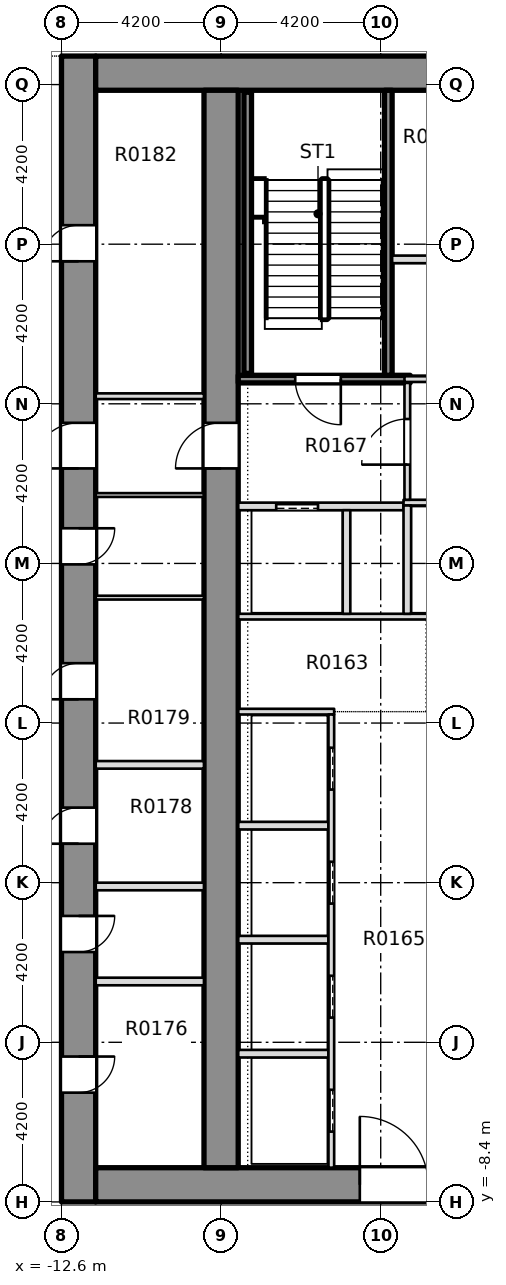
"""IFC4 building model, lengths in metres.
Left out: names, types, materials, properties, quantities, classifications, styles, units other than length and angle.
Written with IfcOpenShell. Run it as: python <this file> out.ifc"""

import sys

from ifc_helpers import new_model, si_unit, direction, frame, frame_2d, origin, place, context, subcontext, project, spatial, rectangle, extrude, element, fill, save


model = new_model("IFC4")
c1 = context("Model", 3, precision=1e-05, world=origin(), true_north=direction((0.0, 1.0)))
c2 = subcontext(c1, "Body", "Model", "MODEL_VIEW")
j1 = project(units=[si_unit("LENGTHUNIT", "METRE"), si_unit("PLANEANGLEUNIT", "RADIAN")], contexts=[c1])
p1 = place(None, origin())
s1 = spatial("IfcSite", under=j1, at=p1, CompositionType="ELEMENT")
p2 = place(p1, origin())
s2 = spatial("IfcBuilding", under=s1, at=p2, CompositionType="ELEMENT")
p3 = place(p2, frame((0.0, 0.0, 7.5)))
s3 = spatial("IfcBuildingStorey", under=s2, at=p3, CompositionType="ELEMENT", Elevation=7.5)
p4 = place(p3, frame((-12.15, -8.4, -0.4), z_axis=(0.0, 0.0, 1.0), x_axis=(0.0, 1.0, 0.0)))
e1 = element("IfcWall", 1, at=p4, inside=s3, PredefinedType="SHEAR", context=c2, shape_type="SweptSolid", body=[
    extrude(rectangle(XDim=30.15, YDim=0.9, at=frame_2d((15.075, 0.0))), origin(), (0.0, 0.0, 1.0), 5.0),
])
p5 = place(p4, frame((2.875, 0.0, 0.4)))
e2 = element("IfcOpeningElement", 2, at=p5, cuts=e1, PredefinedType="OPENING", context=c2, shape_type="SweptSolid", body=[
    extrude(rectangle(XDim=0.95, YDim=2.1, at=frame_2d((0.475, 1.05))), frame((0.0, 0.46, 0.0), z_axis=(0.0, -1.0, 0.0), x_axis=(1.0, 0.0, 0.0)), (0.0, 0.0, 1.0), 0.92),
])
p6 = place(p4, frame((6.575, 0.0, 0.4)))
e3 = element("IfcOpeningElement", 3, at=p6, cuts=e1, PredefinedType="OPENING", context=c2, shape_type="SweptSolid", body=[
    extrude(rectangle(XDim=0.95, YDim=2.1, at=frame_2d((0.475, 1.05))), frame((0.0, 0.46, 0.0), z_axis=(0.0, -1.0, 0.0), x_axis=(1.0, 0.0, 0.0)), (0.0, 0.0, 1.0), 0.92),
])
p7 = place(p4, frame((9.425, 0.0, 0.4)))
e4 = element("IfcOpeningElement", 4, at=p7, cuts=e1, PredefinedType="OPENING", context=c2, shape_type="SweptSolid", body=[
    extrude(rectangle(XDim=0.95, YDim=2.1, at=frame_2d((0.475, 1.05))), frame((0.0, 0.46, 0.0), z_axis=(0.0, -1.0, 0.0), x_axis=(1.0, 0.0, 0.0)), (0.0, 0.0, 1.0), 0.92),
])
p8 = place(p4, frame((13.225, 0.0, 0.4)))
e5 = element("IfcOpeningElement", 5, at=p8, cuts=e1, PredefinedType="OPENING", context=c2, shape_type="SweptSolid", body=[
    extrude(rectangle(XDim=0.95, YDim=2.1, at=frame_2d((0.475, 1.05))), frame((0.0, 0.46, 0.0), z_axis=(0.0, -1.0, 0.0), x_axis=(1.0, 0.0, 0.0)), (0.0, 0.0, 1.0), 0.92),
])
p9 = place(p4, frame((16.775, 0.0, 0.4)))
e6 = element("IfcOpeningElement", 6, at=p9, cuts=e1, PredefinedType="OPENING", context=c2, shape_type="SweptSolid", body=[
    extrude(rectangle(XDim=0.95, YDim=2.1, at=frame_2d((0.475, 1.05))), frame((0.0, 0.46, 0.0), z_axis=(0.0, -1.0, 0.0), x_axis=(1.0, 0.0, 0.0)), (0.0, 0.0, 1.0), 0.92),
])
p10 = place(p4, frame((24.75, 0.0, 0.4)))
e7 = element("IfcOpeningElement", 7, at=p10, cuts=e1, PredefinedType="OPENING", context=c2, shape_type="SweptSolid", body=[
    extrude(rectangle(XDim=0.95, YDim=2.1, at=frame_2d((0.475, 1.05))), frame((0.0, 0.46, 0.0), z_axis=(0.0, -1.0, 0.0), x_axis=(1.0, 0.0, 0.0)), (0.0, 0.0, 1.0), 0.92),
])
p11 = place(p4, frame((19.3, 0.0, 0.4)))
e8 = element("IfcOpeningElement", 8, at=p11, cuts=e1, PredefinedType="OPENING", context=c2, shape_type="SweptSolid", body=[
    extrude(rectangle(XDim=1.2, YDim=2.1, at=frame_2d((0.6, 1.05))), frame((0.0, 0.46, 0.0), z_axis=(0.0, -1.0, 0.0), x_axis=(1.0, 0.0, 0.0)), (0.0, 0.0, 1.0), 0.92),
])
p12 = place(p3, frame((-11.7, -7.95, -0.4), z_axis=(0.0, 0.0, 1.0), x_axis=(1.0, 0.0, 0.0)))
e9 = element("IfcWall", 9, at=p12, inside=s3, PredefinedType="SHEAR", context=c2, shape_type="SweptSolid", body=[
    extrude(rectangle(XDim=23.4, YDim=0.9, at=frame_2d((11.7, 0.0))), origin(), (0.0, 0.0, 1.0), 5.0),
])
p13 = place(p12, frame((6.95, 0.0, 0.4)))
e10 = element("IfcOpeningElement", 10, at=p13, cuts=e9, PredefinedType="OPENING", context=c2, shape_type="SweptSolid", body=[
    extrude(rectangle(XDim=1.8, YDim=2.1, at=frame_2d((0.9, 1.05))), frame((0.0, 0.46, 0.0), z_axis=(0.0, -1.0, 0.0), x_axis=(1.0, 0.0, 0.0)), (0.0, 0.0, 1.0), 0.92),
])
p14 = place(p12, frame((14.65, 0.0, 0.4)))
e11 = element("IfcOpeningElement", 11, at=p14, cuts=e9, PredefinedType="OPENING", context=c2, shape_type="SweptSolid", body=[
    extrude(rectangle(XDim=1.8, YDim=2.1, at=frame_2d((0.9, 1.05))), frame((0.0, 0.46, 0.0), z_axis=(0.0, -1.0, 0.0), x_axis=(1.0, 0.0, 0.0)), (0.0, 0.0, 1.0), 0.92),
])
p15 = place(p3, frame((-11.7, 21.3, -0.4), z_axis=(0.0, 0.0, 1.0), x_axis=(1.0, 0.0, 0.0)))
e12 = element("IfcWall", 12, at=p15, inside=s3, PredefinedType="SOLIDWALL", context=c2, shape_type="SweptSolid", body=[
    extrude(rectangle(XDim=23.4, YDim=0.9, at=frame_2d((11.7, 0.0))), origin(), (0.0, 0.0, 1.0), 5.0),
])
p16 = place(p3, frame((-8.4, -7.5, -0.4), z_axis=(0.0, 0.0, 1.0), x_axis=(0.0, 1.0, 0.0)))
e13 = element("IfcWall", 13, at=p16, inside=s3, PredefinedType="SHEAR", context=c2, shape_type="SweptSolid", body=[
    extrude(rectangle(XDim=28.35, YDim=0.9, at=frame_2d((14.175, 0.0))), origin(), (0.0, 0.0, 1.0), 5.0),
])
p17 = place(p16, frame((18.4, 0.0, 0.4)))
e14 = element("IfcOpeningElement", 14, at=p17, cuts=e13, PredefinedType="OPENING", context=c2, shape_type="SweptSolid", body=[
    extrude(rectangle(XDim=1.2, YDim=2.1, at=frame_2d((0.6, 1.05))), frame((0.0, 0.46, 0.0), z_axis=(0.0, -1.0, 0.0), x_axis=(1.0, 0.0, 0.0)), (0.0, 0.0, 1.0), 0.92),
])
for number, where, z_axis, x_axis in (
    (15, (-7.949, -4.5, 0.0), (0.0, 0.0, 1.0), (1.0, 0.0, 0.0)),
    (16, (-7.949, -1.5, 0.0), (0.0, 0.0, 1.0), (1.0, 0.0, 0.0)),
    (17, (-7.949, 1.5, 0.0), (0.0, 0.0, 1.0), (1.0, 0.0, 0.0)),
):
    element("IfcWall", number, at=place(p3, frame(where, z_axis=z_axis, x_axis=x_axis)), inside=s3, PredefinedType="PARTITIONING", context=c2, shape_type="SweptSolid", body=[
        extrude(rectangle(XDim=2.374, YDim=0.2, at=frame_2d((1.187, 0.0))), origin(), (0.0, 0.0, 1.0), 4.6),
    ])
p18 = place(p3, frame((-7.949, 4.5, 0.0), z_axis=(0.0, 0.0, 1.0), x_axis=(1.0, 0.0, 0.0)))
e18 = element("IfcWall", 18, at=p18, inside=s3, PredefinedType="PARTITIONING", context=c2, shape_type="SweptSolid", body=[
    extrude(rectangle(XDim=2.524, YDim=0.15, at=frame_2d((1.262, 0.0))), origin(), (0.0, 0.0, 1.0), 4.6),
])
p19 = place(p3, frame((-7.949, 7.0, 0.0), z_axis=(0.0, 0.0, 1.0), x_axis=(1.0, 0.0, 0.0)))
e19 = element("IfcWall", 19, at=p19, inside=s3, PredefinedType="PARTITIONING", context=c2, shape_type="SweptSolid", body=[
    extrude(rectangle(XDim=15.898, YDim=0.15, at=frame_2d((7.949, 0.0))), origin(), (0.0, 0.0, 1.0), 4.6),
])
p20 = place(p19, frame((7.249, 0.0, 0.0)))
e20 = element("IfcOpeningElement", 20, at=p20, cuts=e19, PredefinedType="OPENING", context=c2, shape_type="SweptSolid", body=[
    extrude(rectangle(XDim=1.4, YDim=2.1, at=frame_2d((0.7, 1.05))), frame((0.0, 0.085, 0.0), z_axis=(0.0, -1.0, 0.0), x_axis=(1.0, 0.0, 0.0)), (0.0, 0.0, 1.0), 0.17),
])
p21 = place(p3, frame((-7.949, 9.9, 0.0), z_axis=(0.0, 0.0, 1.0), x_axis=(1.0, 0.0, 0.0)))
e21 = element("IfcWall", 21, at=p21, inside=s3, PredefinedType="PARTITIONING", context=c2, shape_type="SweptSolid", body=[
    extrude(rectangle(XDim=4.349, YDim=0.2, at=frame_2d((2.174, 0.0))), origin(), (0.0, 0.0, 1.0), 4.6),
])
p22 = place(p21, frame((0.999, 0.0, 0.0)))
e22 = element("IfcOpeningElement", 22, at=p22, cuts=e21, PredefinedType="OPENING", context=c2, shape_type="SweptSolid", body=[
    extrude(rectangle(XDim=1.1, YDim=2.1, at=frame_2d((0.55, 1.05))), frame((0.0, 0.11, 0.0), z_axis=(0.0, -1.0, 0.0), x_axis=(1.0, 0.0, 0.0)), (0.0, 0.0, 1.0), 0.22),
])
p23 = place(p3, frame((-3.6, 10.0, 0.0), z_axis=(0.0, 0.0, 1.0), x_axis=(1.0, 0.0, 0.0)))
e23 = element("IfcWall", 23, at=p23, inside=s3, PredefinedType="PARTITIONING", context=c2, shape_type="SweptSolid", body=[
    extrude(rectangle(XDim=7.2, YDim=0.15, at=frame_2d((3.6, 0.0))), origin(), (0.0, 0.0, 1.0), 4.6),
])
p24 = place(p23, frame((2.9, 0.0, 0.0)))
e24 = element("IfcOpeningElement", 24, at=p24, cuts=e23, PredefinedType="OPENING", context=c2, shape_type="SweptSolid", body=[
    extrude(rectangle(XDim=1.4, YDim=2.1, at=frame_2d((0.7, 1.05))), frame((0.0, 0.085, 0.0), z_axis=(0.0, -1.0, 0.0), x_axis=(1.0, 0.0, 0.0)), (0.0, 0.0, 1.0), 0.17),
])
p25 = place(p3, frame((-7.949, 13.25, 0.0), z_axis=(0.0, 0.0, 1.0), x_axis=(1.0, 0.0, 0.0)))
e25 = element("IfcWall", 25, at=p25, inside=s3, PredefinedType="SOLIDWALL", context=c2, shape_type="SweptSolid", body=[
    extrude(rectangle(XDim=4.524, YDim=0.2, at=frame_2d((2.262, 0.0))), origin(), (0.0, 0.0, 1.0), 4.6),
])
p26 = place(p25, frame((1.499, 0.0, 0.0)))
e26 = element("IfcOpeningElement", 26, at=p26, cuts=e25, PredefinedType="OPENING", context=c2, shape_type="SweptSolid", body=[
    extrude(rectangle(XDim=1.2, YDim=2.1, at=frame_2d((0.6, 1.05))), frame((0.0, 0.11, 0.0), z_axis=(0.0, -1.0, 0.0), x_axis=(1.0, 0.0, 0.0)), (0.0, 0.0, 1.0), 0.22),
])
p27 = place(p3, frame((-3.575, 13.25, 0.0), z_axis=(0.0, 0.0, 1.0), x_axis=(1.0, 0.0, 0.0)))
e27 = element("IfcWall", 27, at=p27, inside=s3, PredefinedType="PARTITIONING", context=c2, shape_type="SweptSolid", body=[
    extrude(rectangle(XDim=7.15, YDim=0.15, at=frame_2d((3.575, 0.0))), origin(), (0.0, 0.0, 1.0), 4.6),
])
p28 = place(p27, frame((0.6, 0.0, 0.0)))
e28 = element("IfcOpeningElement", 28, at=p28, cuts=e27, PredefinedType="OPENING", context=c2, shape_type="SweptSolid", body=[
    extrude(rectangle(XDim=1.2, YDim=2.1, at=frame_2d((0.6, 1.05))), frame((0.0, 0.085, 0.0), z_axis=(0.0, -1.0, 0.0), x_axis=(1.0, 0.0, 0.0)), (0.0, 0.0, 1.0), 0.17),
])
p29 = place(p27, frame((5.4, 0.0, 0.0)))
e29 = element("IfcOpeningElement", 29, at=p29, cuts=e27, PredefinedType="OPENING", context=c2, shape_type="SweptSolid", body=[
    extrude(rectangle(XDim=1.1, YDim=2.1, at=frame_2d((0.55, 1.05))), frame((0.0, 0.085, 0.0), z_axis=(0.0, -1.0, 0.0), x_axis=(1.0, 0.0, 0.0)), (0.0, 0.0, 1.0), 0.17),
])
p30 = place(p27, frame((2.975, 0.0, 0.0)))
e30 = element("IfcOpeningElement", 30, at=p30, cuts=e27, PredefinedType="OPENING", context=c2, shape_type="SweptSolid", body=[
    extrude(rectangle(XDim=1.2, YDim=2.1, at=frame_2d((0.6, 1.05))), frame((0.0, 0.085, 0.0), z_axis=(0.0, -1.0, 0.0), x_axis=(1.0, 0.0, 0.0)), (0.0, 0.0, 1.0), 0.17),
])
p31 = place(p3, frame((-3.9, 16.4, 0.0), z_axis=(0.0, 0.0, 1.0), x_axis=(1.0, 0.0, 0.0)))
e31 = element("IfcWall", 31, at=p31, inside=s3, PredefinedType="PARTITIONING", context=c2, shape_type="SweptSolid", body=[
    extrude(rectangle(XDim=3.05, YDim=0.2, at=frame_2d((1.525, 0.0))), origin(), (0.0, 0.0, 1.0), 4.6),
])
p32 = place(p3, frame((-5.5, -7.499, 0.0), z_axis=(0.0, 0.0, 1.0), x_axis=(0.0, 1.0, 0.0)))
e32 = element("IfcWall", 32, at=p32, inside=s3, PredefinedType="PARTITIONING", context=c2, shape_type="SweptSolid", body=[
    extrude(rectangle(XDim=11.924, YDim=0.15, at=frame_2d((5.962, 0.0))), origin(), (0.0, 0.0, 1.0), 4.6),
])
p33 = place(p32, frame((0.949, 0.0, 0.0)))
e33 = element("IfcOpeningElement", 33, at=p33, cuts=e32, PredefinedType="OPENING", context=c2, shape_type="SweptSolid", body=[
    extrude(rectangle(XDim=1.1, YDim=2.1, at=frame_2d((0.55, 1.05))), frame((0.0, 0.085, 0.0), z_axis=(0.0, -1.0, 0.0), x_axis=(1.0, 0.0, 0.0)), (0.0, 0.0, 1.0), 0.17),
])
p34 = place(p32, frame((3.949, 0.0, 0.0)))
e34 = element("IfcOpeningElement", 34, at=p34, cuts=e32, PredefinedType="OPENING", context=c2, shape_type="SweptSolid", body=[
    extrude(rectangle(XDim=1.1, YDim=2.1, at=frame_2d((0.55, 1.05))), frame((0.0, 0.085, 0.0), z_axis=(0.0, -1.0, 0.0), x_axis=(1.0, 0.0, 0.0)), (0.0, 0.0, 1.0), 0.17),
])
p35 = place(p32, frame((6.949, 0.0, 0.0)))
e35 = element("IfcOpeningElement", 35, at=p35, cuts=e32, PredefinedType="OPENING", context=c2, shape_type="SweptSolid", body=[
    extrude(rectangle(XDim=1.1, YDim=2.1, at=frame_2d((0.55, 1.05))), frame((0.0, 0.085, 0.0), z_axis=(0.0, -1.0, 0.0), x_axis=(1.0, 0.0, 0.0)), (0.0, 0.0, 1.0), 0.17),
])
p36 = place(p32, frame((9.949, 0.0, 0.0)))
e36 = element("IfcOpeningElement", 36, at=p36, cuts=e32, PredefinedType="OPENING", context=c2, shape_type="SweptSolid", body=[
    extrude(rectangle(XDim=1.1, YDim=2.1, at=frame_2d((0.55, 1.05))), frame((0.0, 0.085, 0.0), z_axis=(0.0, -1.0, 0.0), x_axis=(1.0, 0.0, 0.0)), (0.0, 0.0, 1.0), 0.17),
])
p37 = place(p3, frame((-5.1, 7.075, 0.0), z_axis=(0.0, 0.0, 1.0), x_axis=(0.0, 1.0, 0.0)))
e37 = element("IfcWall", 37, at=p37, inside=s3, PredefinedType="PARTITIONING", context=c2, shape_type="SweptSolid", body=[
    extrude(rectangle(XDim=2.725, YDim=0.2, at=frame_2d((1.363, 0.0))), origin(), (0.0, 0.0, 1.0), 4.6),
])
p38 = place(p3, frame((-4.0, 13.35, 0.0), z_axis=(0.0, 0.0, 1.0), x_axis=(0.0, 1.0, 0.0)))
e38 = element("IfcWall", 38, at=p38, inside=s3, PredefinedType="SOLIDWALL", context=c2, shape_type="SweptSolid", body=[
    extrude(rectangle(XDim=7.499, YDim=0.2, at=frame_2d((3.75, 0.0))), origin(), (0.0, 0.0, 1.0), 4.6),
])
p39 = place(p3, frame((-3.5, 7.075, 0.0), z_axis=(0.0, 0.0, 1.0), x_axis=(0.0, 1.0, 0.0)))
e39 = element("IfcWall", 39, at=p39, inside=s3, PredefinedType="PARTITIONING", context=c2, shape_type="SweptSolid", body=[
    extrude(rectangle(XDim=2.85, YDim=0.2, at=frame_2d((1.425, 0.0))), origin(), (0.0, 0.0, 1.0), 4.6),
])
p40 = place(p3, frame((-3.5, 10.075, 0.0), z_axis=(0.0, 0.0, 1.0), x_axis=(0.0, 1.0, 0.0)))
e40 = element("IfcWall", 40, at=p40, inside=s3, PredefinedType="PARTITIONING", context=c2, shape_type="SweptSolid", body=[
    extrude(rectangle(XDim=3.075, YDim=0.15, at=frame_2d((1.538, 0.0))), origin(), (0.0, 0.0, 1.0), 4.6),
])
p41 = place(p40, frame((0.925, 0.0, 0.0)))
e41 = element("IfcOpeningElement", 41, at=p41, cuts=e40, PredefinedType="OPENING", context=c2, shape_type="SweptSolid", body=[
    extrude(rectangle(XDim=1.2, YDim=2.1, at=frame_2d((0.6, 1.05))), frame((0.0, 0.085, 0.0), z_axis=(0.0, -1.0, 0.0), x_axis=(1.0, 0.0, 0.0)), (0.0, 0.0, 1.0), 0.17),
])
for number, where, z_axis, x_axis in (
    (42, (-11.699, -2.6, 0.0), (0.0, 0.0, 1.0), (1.0, 0.0, 0.0)),
    (43, (-11.699, -0.1, 0.0), (0.0, 0.0, 1.0), (1.0, 0.0, 0.0)),
    (44, (-11.699, 3.1, 0.0), (0.0, 0.0, 1.0), (1.0, 0.0, 0.0)),
):
    element("IfcWall", number, at=place(p3, frame(where, z_axis=z_axis, x_axis=x_axis)), inside=s3, PredefinedType="PARTITIONING", context=c2, shape_type="SweptSolid", body=[
        extrude(rectangle(XDim=2.848, YDim=0.2, at=frame_2d((1.424, 0.0))), origin(), (0.0, 0.0, 1.0), 4.6),
    ])
for number, where, z_axis, x_axis in (
    (45, (-11.699, 7.5, 0.0), (0.0, 0.0, 1.0), (1.0, 0.0, 0.0)),
    (46, (-11.699, 10.2, 0.0), (0.0, 0.0, 1.0), (1.0, 0.0, 0.0)),
):
    element("IfcWall", number, at=place(p3, frame(where, z_axis=z_axis, x_axis=x_axis)), inside=s3, PredefinedType="PARTITIONING", context=c2, shape_type="SweptSolid", body=[
        extrude(rectangle(XDim=2.848, YDim=0.1, at=frame_2d((1.424, 0.0))), origin(), (0.0, 0.0, 1.0), 4.6),
    ])
p42 = place(p3, frame((-11.699, 12.8, 0.0), z_axis=(0.0, 0.0, 1.0), x_axis=(1.0, 0.0, 0.0)))
e47 = element("IfcWall", 47, at=p42, inside=s3, PredefinedType="PARTITIONING", context=c2, shape_type="SweptSolid", body=[
    extrude(rectangle(XDim=2.848, YDim=0.15, at=frame_2d((1.424, 0.0))), origin(), (0.0, 0.0, 1.0), 4.6),
])
p43 = place(p3, frame((-7.7, 13.4, 0.0), z_axis=(0.0, 0.0, 1.0), x_axis=(0.0, 1.0, 0.0)))
e48 = element("IfcWall", 48, at=p43, inside=s3, PredefinedType="SOLIDWALL", context=c2, shape_type="SweptSolid", body=[
    extrude(rectangle(XDim=7.4, YDim=0.2, at=frame_2d((3.7, 0.0))), origin(), (0.0, 0.0, 1.0), 4.6),
])
p44 = place(p33, origin())
e49 = element("IfcDoor", 49, at=p44, inside=s3, OperationType="SLIDING_TO_RIGHT", PredefinedType="DOOR", context=c2, shape_type="SweptSolid", body=[
    extrude(rectangle(XDim=1.1, YDim=2.1, at=frame_2d((0.55, 1.05))), frame((0.0, 0.025, 0.0), z_axis=(0.0, -1.0, 0.0), x_axis=(1.0, 0.0, 0.0)), (0.0, 0.0, 1.0), 0.05),
])
fill(e33, e49)
p45 = place(p34, origin())
e50 = element("IfcDoor", 50, at=p45, inside=s3, OperationType="SLIDING_TO_RIGHT", PredefinedType="DOOR", context=c2, shape_type="SweptSolid", body=[
    extrude(rectangle(XDim=1.1, YDim=2.1, at=frame_2d((0.55, 1.05))), frame((0.0, 0.025, 0.0), z_axis=(0.0, -1.0, 0.0), x_axis=(1.0, 0.0, 0.0)), (0.0, 0.0, 1.0), 0.05),
])
fill(e34, e50)
p46 = place(p35, origin())
e51 = element("IfcDoor", 51, at=p46, inside=s3, OperationType="SLIDING_TO_RIGHT", PredefinedType="DOOR", context=c2, shape_type="SweptSolid", body=[
    extrude(rectangle(XDim=1.1, YDim=2.1, at=frame_2d((0.55, 1.05))), frame((0.0, 0.025, 0.0), z_axis=(0.0, -1.0, 0.0), x_axis=(1.0, 0.0, 0.0)), (0.0, 0.0, 1.0), 0.05),
])
fill(e35, e51)
p47 = place(p36, origin())
e52 = element("IfcDoor", 52, at=p47, inside=s3, OperationType="SLIDING_TO_RIGHT", PredefinedType="DOOR", context=c2, shape_type="SweptSolid", body=[
    extrude(rectangle(XDim=1.1, YDim=2.1, at=frame_2d((0.55, 1.05))), frame((0.0, 0.025, 0.0), z_axis=(0.0, -1.0, 0.0), x_axis=(1.0, 0.0, 0.0)), (0.0, 0.0, 1.0), 0.05),
])
fill(e36, e52)
p48 = place(p26, origin())
e53 = element("IfcDoor", 53, at=p48, inside=s3, OperationType="SINGLE_SWING_LEFT", PredefinedType="DOOR", context=c2, shape_type="SweptSolid", body=[
    extrude(rectangle(XDim=1.2, YDim=2.1, at=frame_2d((0.6, 1.05))), frame((0.0, 0.025, 0.0), z_axis=(0.0, -1.0, 0.0), x_axis=(1.0, 0.0, 0.0)), (0.0, 0.0, 1.0), 0.05),
])
fill(e26, e53)
p49 = place(p22, origin())
e54 = element("IfcDoor", 54, at=p49, inside=s3, OperationType="SLIDING_TO_RIGHT", PredefinedType="DOOR", context=c2, shape_type="SweptSolid", body=[
    extrude(rectangle(XDim=1.1, YDim=2.1, at=frame_2d((0.55, 1.05))), frame((0.0, 0.025, 0.0), z_axis=(0.0, -1.0, 0.0), x_axis=(1.0, 0.0, 0.0)), (0.0, 0.0, 1.0), 0.05),
])
fill(e22, e54)
p50 = place(p41, origin())
e55 = element("IfcDoor", 55, at=p50, inside=s3, OperationType="SINGLE_SWING_RIGHT", PredefinedType="DOOR", context=c2, shape_type="SweptSolid", body=[
    extrude(rectangle(XDim=1.2, YDim=2.1, at=frame_2d((0.6, 1.05))), frame((0.0, 0.025, 0.0), z_axis=(0.0, -1.0, 0.0), x_axis=(1.0, 0.0, 0.0)), (0.0, 0.0, 1.0), 0.05),
])
fill(e41, e55)
p51 = place(p13, origin())
e56 = element("IfcDoor", 56, at=p51, inside=s3, OperationType="SINGLE_SWING_LEFT", PredefinedType="DOOR", context=c2, shape_type="SweptSolid", body=[
    extrude(rectangle(XDim=1.8, YDim=2.1, at=frame_2d((0.9, 1.05))), frame((0.0, 0.025, 0.0), z_axis=(0.0, -1.0, 0.0), x_axis=(1.0, 0.0, 0.0)), (0.0, 0.0, 1.0), 0.05),
])
fill(e10, e56)
p52 = place(p5, origin())
e57 = element("IfcDoor", 57, at=p52, inside=s3, OperationType="SINGLE_SWING_LEFT", PredefinedType="DOOR", context=c2, shape_type="SweptSolid", body=[
    extrude(rectangle(XDim=0.95, YDim=2.1, at=frame_2d((0.475, 1.05))), frame((0.0, 0.025, 0.0), z_axis=(0.0, -1.0, 0.0), x_axis=(1.0, 0.0, 0.0)), (0.0, 0.0, 1.0), 0.05),
])
fill(e2, e57)
p53 = place(p6, origin())
e58 = element("IfcDoor", 58, at=p53, inside=s3, OperationType="SINGLE_SWING_LEFT", PredefinedType="DOOR", context=c2, shape_type="SweptSolid", body=[
    extrude(rectangle(XDim=0.95, YDim=2.1, at=frame_2d((0.475, 1.05))), frame((0.0, 0.025, 0.0), z_axis=(0.0, -1.0, 0.0), x_axis=(1.0, 0.0, 0.0)), (0.0, 0.0, 1.0), 0.05),
])
fill(e3, e58)
p54 = place(p7, origin())
e59 = element("IfcDoor", 59, at=p54, inside=s3, OperationType="SINGLE_SWING_LEFT", PredefinedType="DOOR", context=c2, shape_type="SweptSolid", body=[
    extrude(rectangle(XDim=0.95, YDim=2.1, at=frame_2d((0.475, 1.05))), frame((0.0, 0.025, 0.0), z_axis=(0.0, -1.0, 0.0), x_axis=(1.0, 0.0, 0.0)), (0.0, 0.0, 1.0), 0.05),
])
fill(e4, e59)
p55 = place(p8, origin())
e60 = element("IfcDoor", 60, at=p55, inside=s3, OperationType="SINGLE_SWING_LEFT", PredefinedType="DOOR", context=c2, shape_type="SweptSolid", body=[
    extrude(rectangle(XDim=0.95, YDim=2.1, at=frame_2d((0.475, 1.05))), frame((0.0, 0.025, 0.0), z_axis=(0.0, -1.0, 0.0), x_axis=(1.0, 0.0, 0.0)), (0.0, 0.0, 1.0), 0.05),
])
fill(e5, e60)
p56 = place(p9, origin())
e61 = element("IfcDoor", 61, at=p56, inside=s3, OperationType="SINGLE_SWING_LEFT", PredefinedType="DOOR", context=c2, shape_type="SweptSolid", body=[
    extrude(rectangle(XDim=0.95, YDim=2.1, at=frame_2d((0.475, 1.05))), frame((0.0, 0.025, 0.0), z_axis=(0.0, -1.0, 0.0), x_axis=(1.0, 0.0, 0.0)), (0.0, 0.0, 1.0), 0.05),
])
fill(e6, e61)
p57 = place(p10, origin())
e62 = element("IfcDoor", 62, at=p57, inside=s3, OperationType="SINGLE_SWING_LEFT", PredefinedType="DOOR", context=c2, shape_type="SweptSolid", body=[
    extrude(rectangle(XDim=0.95, YDim=2.1, at=frame_2d((0.475, 1.05))), frame((0.0, 0.025, 0.0), z_axis=(0.0, -1.0, 0.0), x_axis=(1.0, 0.0, 0.0)), (0.0, 0.0, 1.0), 0.05),
])
fill(e7, e62)
p58 = place(p11, origin())
e63 = element("IfcDoor", 63, at=p58, inside=s3, OperationType="SINGLE_SWING_LEFT", PredefinedType="DOOR", context=c2, shape_type="SweptSolid", body=[
    extrude(rectangle(XDim=1.2, YDim=2.1, at=frame_2d((0.6, 1.05))), frame((0.0, 0.025, 0.0), z_axis=(0.0, -1.0, 0.0), x_axis=(1.0, 0.0, 0.0)), (0.0, 0.0, 1.0), 0.05),
])
fill(e8, e63)
p59 = place(p17, origin())
e64 = element("IfcDoor", 64, at=p59, inside=s3, OperationType="SINGLE_SWING_LEFT", PredefinedType="DOOR", context=c2, shape_type="SweptSolid", body=[
    extrude(rectangle(XDim=1.2, YDim=2.1, at=frame_2d((0.6, 1.05))), frame((0.0, 0.025, 0.0), z_axis=(0.0, -1.0, 0.0), x_axis=(1.0, 0.0, 0.0)), (0.0, 0.0, 1.0), 0.05),
])
fill(e14, e64)
save(model, sys.argv[1])
